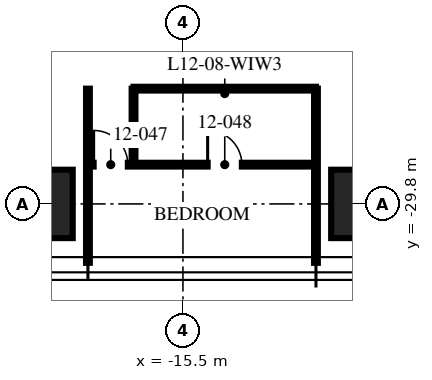
"""IFC4 building model, lengths in metres.
Left out: names, types, materials, properties, quantities, classifications, styles, units other than length and angle.
Written with IfcOpenShell. Run it as: python <this file> out.ifc"""

import sys

from ifc_helpers import new_model, si_unit, direction, frame, frame_2d, origin, origin_2d, place, context, subcontext, project, spatial, rectangle, hollow_rectangle, extrude, element, fill, save


model = new_model("IFC4")
c1 = context("Model", 3, precision=1e-05, world=origin(), true_north=direction((0.0, 1.0)))
c2 = subcontext(c1, "Body", "Model", "MODEL_VIEW")
j1 = project(units=[si_unit("LENGTHUNIT", "METRE"), si_unit("PLANEANGLEUNIT", "RADIAN")], contexts=[c1])
p1 = place(None, origin())
s1 = spatial("IfcSite", under=j1, at=p1, CompositionType="ELEMENT")
p2 = place(p1, origin())
s2 = spatial("IfcBuilding", under=s1, at=p2, CompositionType="ELEMENT")
p3 = place(p2, frame((0.0, 0.0, 51.0)))
s3 = spatial("IfcBuildingStorey", under=s2, at=p3, CompositionType="ELEMENT", Elevation=51.0)
for number, where, z_axis, x_axis in (
    (1, (-10.0, -29.8, 0.0), (0.0, 0.0, 1.0), (1.0, 0.0, 0.0)),
    (2, (-20.0, -29.8, 0.0), (0.0, 0.0, 1.0), (1.0, 0.0, 0.0)),
):
    element("IfcColumn", number, at=place(p3, frame(where, z_axis=z_axis, x_axis=x_axis)), inside=s3, PredefinedType="COLUMN", context=c2, shape_type="SweptSolid", body=[
        extrude(hollow_rectangle(XDim=3.2, YDim=1.8, WallThickness=0.2, at=origin_2d()), origin(), (0.0, 0.0, 1.0), 3.75),
    ])
for number, where, z_axis, x_axis in (
    (3, (-18.0, -26.767, 0.0), (0.0, 0.0, 1.0), (0.0, -1.0, 0.0)),
    (4, (-12.0, -26.767, 0.0), (0.0, 0.0, 1.0), (0.0, -1.0, 0.0)),
):
    element("IfcWall", number, at=place(p3, frame(where, z_axis=z_axis, x_axis=x_axis)), inside=s3, PredefinedType="PARTITIONING", context=c2, shape_type="SweptSolid", body=[
        extrude(rectangle(XDim=4.583, YDim=0.1, at=frame_2d((2.292, 0.0))), origin(), (0.0, 0.0, 1.0), 2.71),
    ])
p4 = place(p3, frame((-18.0, -28.767, 0.0), z_axis=(0.0, 0.0, 1.0), x_axis=(1.0, 0.0, 0.0)))
e5 = element("IfcWall", 5, at=p4, inside=s3, PredefinedType="PARTITIONING", context=c2, shape_type="SweptSolid", body=[
    extrude(rectangle(XDim=6.0, YDim=0.1, at=frame_2d((3.0, 0.0))), origin(), (0.0, 0.0, 1.0), 2.61),
])
p5 = place(p4, frame((0.15, 0.0, 0.0)))
e6 = element("IfcOpeningElement", 6, at=p5, cuts=e5, PredefinedType="OPENING", context=c2, shape_type="SweptSolid", body=[
    extrude(rectangle(XDim=0.9, YDim=2.1, at=frame_2d((0.45, 1.05))), frame((0.0, 0.06, 0.0), z_axis=(0.0, -1.0, 0.0), x_axis=(1.0, 0.0, 0.0)), (0.0, 0.0, 1.0), 0.12),
])
p6 = place(p4, frame((3.15, 0.0, 0.0)))
e7 = element("IfcOpeningElement", 7, at=p6, cuts=e5, PredefinedType="OPENING", context=c2, shape_type="SweptSolid", body=[
    extrude(rectangle(XDim=0.9, YDim=2.1, at=frame_2d((0.45, 1.05))), frame((0.0, 0.06, 0.0), z_axis=(0.0, -1.0, 0.0), x_axis=(1.0, 0.0, 0.0)), (0.0, 0.0, 1.0), 0.12),
])
p7 = place(p3, frame((-16.8, -26.767, 0.0), z_axis=(0.0, 0.0, 1.0), x_axis=(0.0, -1.0, 0.0)))
e8 = element("IfcWall", 8, at=p7, inside=s3, PredefinedType="PARTITIONING", context=c2, shape_type="SweptSolid", body=[
    extrude(rectangle(XDim=2.0, YDim=0.1, at=frame_2d((1.0, 0.0))), origin(), (0.0, 0.0, 1.0), 3.5),
])
p8 = place(p3, frame((-16.8, -26.767, 0.0), z_axis=(0.0, 0.0, 1.0), x_axis=(1.0, 0.0, 0.0)))
e9 = element("IfcWall", 9, at=p8, inside=s3, PredefinedType="PARTITIONING", context=c2, shape_type="SweptSolid", body=[
    extrude(rectangle(XDim=4.8, YDim=0.1, at=frame_2d((2.4, 0.0))), origin(), (0.0, 0.0, 1.0), 2.61),
])
p9 = place(p5, origin())
e10 = element("IfcDoor", 10, at=p9, inside=s3, OperationType="SINGLE_SWING_LEFT", PredefinedType="DOOR", context=c2, shape_type="SweptSolid", body=[
    extrude(rectangle(XDim=0.9, YDim=2.1, at=frame_2d((0.45, 1.05))), frame((0.0, 0.025, 0.0), z_axis=(0.0, -1.0, 0.0), x_axis=(1.0, 0.0, 0.0)), (0.0, 0.0, 1.0), 0.05),
])
fill(e6, e10)
p10 = place(p6, origin())
e11 = element("IfcDoor", 11, at=p10, inside=s3, OperationType="SINGLE_SWING_LEFT", PredefinedType="DOOR", context=c2, shape_type="SweptSolid", body=[
    extrude(rectangle(XDim=0.9, YDim=2.1, at=frame_2d((0.45, 1.05))), frame((0.0, 0.025, 0.0), z_axis=(0.0, -1.0, 0.0), x_axis=(1.0, 0.0, 0.0)), (0.0, 0.0, 1.0), 0.05),
])
fill(e7, e11)
save(model, sys.argv[1])
